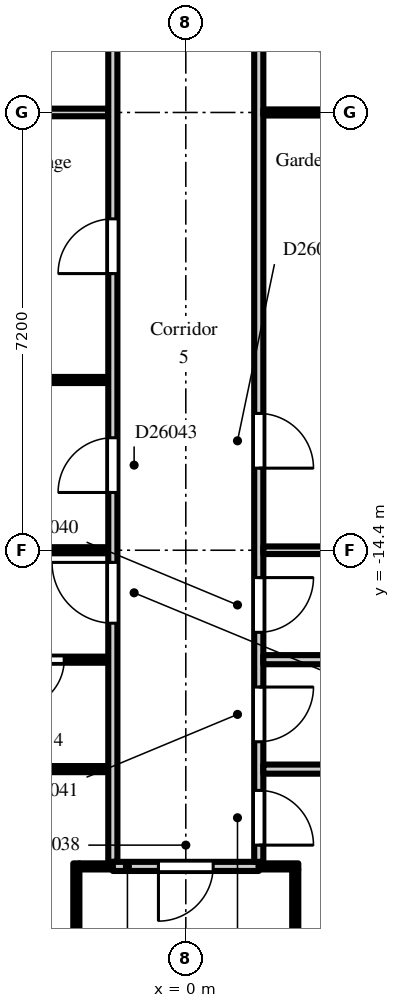
"""IFC4 building model, lengths in metres.
Left out: names, types, materials, properties, quantities, classifications, styles, units other than length and angle.
Written with IfcOpenShell. Run it as: python <this file> out.ifc"""

import sys

from ifc_helpers import new_model, si_unit, direction, frame, frame_2d, origin, place, context, subcontext, project, spatial, rectangle, extrude, element, fill, save


model = new_model("IFC4")
c1 = context("Model", 3, precision=1e-05, world=origin(), true_north=direction((0.0, 1.0)))
c2 = subcontext(c1, "Body", "Model", "MODEL_VIEW")
j1 = project(units=[si_unit("LENGTHUNIT", "METRE"), si_unit("PLANEANGLEUNIT", "RADIAN")], contexts=[c1])
p1 = place(None, origin())
s1 = spatial("IfcSite", under=j1, at=p1, CompositionType="ELEMENT")
p2 = place(p1, origin())
s2 = spatial("IfcBuilding", under=s1, at=p2, CompositionType="ELEMENT")
p3 = place(p2, frame((0.0, 0.0, 179.7)))
s3 = spatial("IfcBuildingStorey", under=s2, at=p3, CompositionType="ELEMENT", Elevation=179.7)
for number, where, z_axis, x_axis in (
    (1, (-3.9, -14.4, 0.0), (0.0, 0.0, 1.0), (1.0, 0.0, 0.0)),
    (2, (-3.9, -11.6, 0.0), (0.0, 0.0, 1.0), (1.0, 0.0, 0.0)),
):
    element("IfcWall", number, at=place(p3, frame(where, z_axis=z_axis, x_axis=x_axis)), inside=s3, PredefinedType="PARTITIONING", context=c2, shape_type="SweptSolid", body=[
        extrude(rectangle(XDim=2.625, YDim=0.1, at=frame_2d((1.312, 0.0))), origin(), (0.0, 0.0, 1.0), 2.6),
    ])
p4 = place(p3, frame((-3.9, -7.2, 0.0), z_axis=(0.0, 0.0, 1.0), x_axis=(1.0, 0.0, 0.0)))
e3 = element("IfcWall", 3, at=p4, inside=s3, PredefinedType="PARTITIONING", context=c2, shape_type="SweptSolid", body=[
    extrude(rectangle(XDim=2.625, YDim=0.125, at=frame_2d((1.312, 0.0))), origin(), (0.0, 0.0, 1.0), 2.6),
])
p5 = place(p3, frame((-3.55, -18.0, 0.0), z_axis=(0.0, 0.0, 1.0), x_axis=(1.0, 0.0, 0.0)))
e4 = element("IfcWall", 4, at=p5, inside=s3, PredefinedType="PARTITIONING", context=c2, shape_type="SweptSolid", body=[
    extrude(rectangle(XDim=2.275, YDim=0.1, at=frame_2d((1.138, 0.0))), origin(), (0.0, 0.0, 1.0), 2.6),
])
p6 = place(p3, frame((-3.55, -16.2, 0.0), z_axis=(0.0, 0.0, 1.0), x_axis=(1.0, 0.0, 0.0)))
e5 = element("IfcWall", 5, at=p6, inside=s3, PredefinedType="PARTITIONING", context=c2, shape_type="SweptSolid", body=[
    extrude(rectangle(XDim=2.275, YDim=0.1, at=frame_2d((1.138, 0.0))), origin(), (0.0, 0.0, 1.0), 2.6),
])
p7 = place(p6, frame((0.75, 0.0, 0.0)))
e6 = element("IfcOpeningElement", 6, at=p7, cuts=e5, PredefinedType="OPENING", context=c2, shape_type="SweptSolid", body=[
    extrude(rectangle(XDim=0.8, YDim=2.1, at=frame_2d((0.4, 1.05))), frame((0.0, 0.06, 0.0), z_axis=(0.0, -1.0, 0.0), x_axis=(1.0, 0.0, 0.0)), (0.0, 0.0, 1.0), 0.12),
])
p8 = place(p3, frame((-1.8, -21.3, 0.0), z_axis=(0.0, 0.0, 1.0), x_axis=(0.0, 1.0, 0.0)))
e7 = element("IfcWall", 7, at=p8, inside=s3, PredefinedType="PARTITIONING", context=c2, shape_type="SweptSolid", body=[
    extrude(rectangle(XDim=1.75, YDim=0.1, at=frame_2d((0.875, 0.0))), origin(), (0.0, 0.0, 1.0), 2.6),
])
p9 = place(p3, frame((-1.75, -19.6, 0.0), z_axis=(0.0, 0.0, 1.0), x_axis=(1.0, 0.0, 0.0)))
e8 = element("IfcWall", 8, at=p9, inside=s3, PredefinedType="PARTITIONING", context=c2, shape_type="SweptSolid", body=[
    extrude(rectangle(XDim=0.55, YDim=0.1, at=frame_2d((0.275, 0.0))), origin(), (0.0, 0.0, 1.0), 2.6),
])
p10 = place(p3, frame((-1.2, -19.525, 0.0), z_axis=(0.0, 0.0, 1.0), x_axis=(0.0, 1.0, 0.0)))
e9 = element("IfcWall", 9, at=p10, inside=s3, PredefinedType="PARTITIONING", context=c2, shape_type="SweptSolid", body=[
    extrude(rectangle(XDim=18.25, YDim=0.15, at=frame_2d((9.125, 0.0))), origin(), (0.0, 0.0, 1.0), 2.6),
])
p11 = place(p10, frame((14.875, 0.0, 0.0)))
e10 = element("IfcOpeningElement", 10, at=p11, cuts=e9, PredefinedType="OPENING", context=c2, shape_type="SweptSolid", body=[
    extrude(rectangle(XDim=0.9, YDim=2.1, at=frame_2d((0.45, 1.05))), frame((0.0, 0.085, 0.0), z_axis=(0.0, -1.0, 0.0), x_axis=(1.0, 0.0, 0.0)), (0.0, 0.0, 1.0), 0.17),
])
p12 = place(p10, frame((6.075, 0.0, 0.0)))
e11 = element("IfcOpeningElement", 11, at=p12, cuts=e9, PredefinedType="OPENING", context=c2, shape_type="SweptSolid", body=[
    extrude(rectangle(XDim=0.9, YDim=2.1, at=frame_2d((0.45, 1.05))), frame((0.0, 0.085, 0.0), z_axis=(0.0, -1.0, 0.0), x_axis=(1.0, 0.0, 0.0)), (0.0, 0.0, 1.0), 0.17),
])
p13 = place(p10, frame((9.675, 0.0, 0.0)))
e12 = element("IfcOpeningElement", 12, at=p13, cuts=e9, PredefinedType="OPENING", context=c2, shape_type="SweptSolid", body=[
    extrude(rectangle(XDim=0.9, YDim=2.1, at=frame_2d((0.45, 1.05))), frame((0.0, 0.085, 0.0), z_axis=(0.0, -1.0, 0.0), x_axis=(1.0, 0.0, 0.0)), (0.0, 0.0, 1.0), 0.17),
])
p14 = place(p10, frame((3.925, 0.0, 0.0)))
e13 = element("IfcOpeningElement", 13, at=p14, cuts=e9, PredefinedType="OPENING", context=c2, shape_type="SweptSolid", body=[
    extrude(rectangle(XDim=1.0, YDim=2.1, at=frame_2d((0.5, 1.05))), frame((0.0, 0.085, 0.0), z_axis=(0.0, -1.0, 0.0), x_axis=(1.0, 0.0, 0.0)), (0.0, 0.0, 1.0), 0.17),
])
p15 = place(p3, frame((-1.2, -19.6, 0.0), z_axis=(0.0, 0.0, 1.0), x_axis=(1.0, 0.0, 0.0)))
e14 = element("IfcWall", 14, at=p15, inside=s3, PredefinedType="PARTITIONING", context=c2, shape_type="SweptSolid", body=[
    extrude(rectangle(XDim=2.4, YDim=0.15, at=frame_2d((1.2, 0.0))), origin(), (0.0, 0.0, 1.0), 2.6),
])
p16 = place(p15, frame((0.75, 0.0, 0.0)))
e15 = element("IfcOpeningElement", 15, at=p16, cuts=e14, PredefinedType="OPENING", context=c2, shape_type="SweptSolid", body=[
    extrude(rectangle(XDim=0.9, YDim=2.1, at=frame_2d((0.45, 1.05))), frame((0.0, 0.085, 0.0), z_axis=(0.0, -1.0, 0.0), x_axis=(1.0, 0.0, 0.0)), (0.0, 0.0, 1.0), 0.17),
])
p17 = place(p3, frame((1.2, -19.525, 0.0), z_axis=(0.0, 0.0, 1.0), x_axis=(0.0, 1.0, 0.0)))
e16 = element("IfcWall", 16, at=p17, inside=s3, PredefinedType="PARTITIONING", context=c2, shape_type="SweptSolid", body=[
    extrude(rectangle(XDim=18.4, YDim=0.15, at=frame_2d((9.2, 0.0))), origin(), (0.0, 0.0, 1.0), 2.6),
])
p18 = place(p17, frame((14.875, 0.0, 0.0)))
e17 = element("IfcOpeningElement", 17, at=p18, cuts=e16, PredefinedType="OPENING", context=c2, shape_type="SweptSolid", body=[
    extrude(rectangle(XDim=0.9, YDim=2.1, at=frame_2d((0.45, 1.05))), frame((0.0, 0.085, 0.0), z_axis=(0.0, -1.0, 0.0), x_axis=(1.0, 0.0, 0.0)), (0.0, 0.0, 1.0), 0.17),
])
p19 = place(p17, frame((6.475, 0.0, 0.0)))
e18 = element("IfcOpeningElement", 18, at=p19, cuts=e16, PredefinedType="OPENING", context=c2, shape_type="SweptSolid", body=[
    extrude(rectangle(XDim=0.9, YDim=2.1, at=frame_2d((0.45, 1.05))), frame((0.0, 0.085, 0.0), z_axis=(0.0, -1.0, 0.0), x_axis=(1.0, 0.0, 0.0)), (0.0, 0.0, 1.0), 0.17),
])
p20 = place(p17, frame((3.775, 0.0, 0.0)))
e19 = element("IfcOpeningElement", 19, at=p20, cuts=e16, PredefinedType="OPENING", context=c2, shape_type="SweptSolid", body=[
    extrude(rectangle(XDim=0.9, YDim=2.1, at=frame_2d((0.45, 1.05))), frame((0.0, 0.085, 0.0), z_axis=(0.0, -1.0, 0.0), x_axis=(1.0, 0.0, 0.0)), (0.0, 0.0, 1.0), 0.17),
])
p21 = place(p17, frame((1.975, 0.0, 0.0)))
e20 = element("IfcOpeningElement", 20, at=p21, cuts=e16, PredefinedType="OPENING", context=c2, shape_type="SweptSolid", body=[
    extrude(rectangle(XDim=0.9, YDim=2.1, at=frame_2d((0.45, 1.05))), frame((0.0, 0.085, 0.0), z_axis=(0.0, -1.0, 0.0), x_axis=(1.0, 0.0, 0.0)), (0.0, 0.0, 1.0), 0.17),
])
p22 = place(p17, frame((0.275, 0.0, 0.0)))
e21 = element("IfcOpeningElement", 21, at=p22, cuts=e16, PredefinedType="OPENING", context=c2, shape_type="SweptSolid", body=[
    extrude(rectangle(XDim=0.9, YDim=2.1, at=frame_2d((0.45, 1.05))), frame((0.0, 0.085, 0.0), z_axis=(0.0, -1.0, 0.0), x_axis=(1.0, 0.0, 0.0)), (0.0, 0.0, 1.0), 0.17),
])
p23 = place(p3, frame((1.2, -19.6, 0.0), z_axis=(0.0, 0.0, 1.0), x_axis=(1.0, 0.0, 0.0)))
e22 = element("IfcWall", 22, at=p23, inside=s3, PredefinedType="PARTITIONING", context=c2, shape_type="SweptSolid", body=[
    extrude(rectangle(XDim=0.65, YDim=0.1, at=frame_2d((0.325, 0.0))), origin(), (0.0, 0.0, 1.0), 2.6),
])
p24 = place(p3, frame((1.275, -18.0, 0.0), z_axis=(0.0, 0.0, 1.0), x_axis=(1.0, 0.0, 0.0)))
e23 = element("IfcWall", 23, at=p24, inside=s3, PredefinedType="PARTITIONING", context=c2, shape_type="SweptSolid", body=[
    extrude(rectangle(XDim=3.825, YDim=0.15, at=frame_2d((1.913, 0.0))), origin(), (0.0, 0.0, 1.0), 2.6),
])
p25 = place(p3, frame((1.275, -16.2, 0.0), z_axis=(0.0, 0.0, 1.0), x_axis=(1.0, 0.0, 0.0)))
e24 = element("IfcWall", 24, at=p25, inside=s3, PredefinedType="PARTITIONING", context=c2, shape_type="SweptSolid", body=[
    extrude(rectangle(XDim=5.625, YDim=0.15, at=frame_2d((2.812, 0.0))), origin(), (0.0, 0.0, 1.0), 2.6),
])
p26 = place(p3, frame((1.275, -14.4, 0.0), z_axis=(0.0, 0.0, 1.0), x_axis=(1.0, 0.0, 0.0)))
e25 = element("IfcWall", 25, at=p26, inside=s3, PredefinedType="PARTITIONING", context=c2, shape_type="SweptSolid", body=[
    extrude(rectangle(XDim=2.625, YDim=0.125, at=frame_2d((1.312, 0.0))), origin(), (0.0, 0.0, 1.0), 2.6),
])
p27 = place(p3, frame((1.275, -7.2, 0.0), z_axis=(0.0, 0.0, 1.0), x_axis=(1.0, 0.0, 0.0)))
e26 = element("IfcWall", 26, at=p27, inside=s3, PredefinedType="PARTITIONING", context=c2, shape_type="SweptSolid", body=[
    extrude(rectangle(XDim=2.625, YDim=0.1, at=frame_2d((1.312, 0.0))), origin(), (0.0, 0.0, 1.0), 2.6),
])
p28 = place(p3, frame((1.8, -21.3, 0.0), z_axis=(0.0, 0.0, 1.0), x_axis=(0.0, 1.0, 0.0)))
e27 = element("IfcWall", 27, at=p28, inside=s3, PredefinedType="PARTITIONING", context=c2, shape_type="SweptSolid", body=[
    extrude(rectangle(XDim=1.65, YDim=0.1, at=frame_2d((0.825, 0.0))), origin(), (0.0, 0.0, 1.0), 2.6),
])
p29 = place(p16, frame((0.9, 0.0, 0.0), z_axis=(0.0, 0.0, 1.0), x_axis=(-1.0, 0.0, 0.0)))
e28 = element("IfcDoor", 28, at=p29, inside=s3, OperationType="SINGLE_SWING_RIGHT", PredefinedType="DOOR", context=c2, shape_type="SweptSolid", body=[
    extrude(rectangle(XDim=0.9, YDim=2.1, at=frame_2d((0.45, 1.05))), frame((0.0, 0.025, 0.0), z_axis=(0.0, -1.0, 0.0), x_axis=(1.0, 0.0, 0.0)), (0.0, 0.0, 1.0), 0.05),
])
fill(e15, e28)
p30 = place(p19, frame((0.9, 0.0, 0.0), z_axis=(0.0, 0.0, 1.0), x_axis=(-1.0, 0.0, 0.0)))
e29 = element("IfcDoor", 29, at=p30, inside=s3, OperationType="SINGLE_SWING_RIGHT", PredefinedType="DOOR", context=c2, shape_type="SweptSolid", body=[
    extrude(rectangle(XDim=0.9, YDim=2.1, at=frame_2d((0.45, 1.05))), frame((0.0, 0.025, 0.0), z_axis=(0.0, -1.0, 0.0), x_axis=(1.0, 0.0, 0.0)), (0.0, 0.0, 1.0), 0.05),
])
fill(e18, e29)
p31 = place(p20, frame((0.9, 0.0, 0.0), z_axis=(0.0, 0.0, 1.0), x_axis=(-1.0, 0.0, 0.0)))
e30 = element("IfcDoor", 30, at=p31, inside=s3, OperationType="SINGLE_SWING_LEFT", PredefinedType="DOOR", context=c2, shape_type="SweptSolid", body=[
    extrude(rectangle(XDim=0.9, YDim=2.1, at=frame_2d((0.45, 1.05))), frame((0.0, 0.025, 0.0), z_axis=(0.0, -1.0, 0.0), x_axis=(1.0, 0.0, 0.0)), (0.0, 0.0, 1.0), 0.05),
])
fill(e19, e30)
p32 = place(p21, frame((0.9, 0.0, 0.0), z_axis=(0.0, 0.0, 1.0), x_axis=(-1.0, 0.0, 0.0)))
e31 = element("IfcDoor", 31, at=p32, inside=s3, OperationType="SINGLE_SWING_LEFT", PredefinedType="DOOR", context=c2, shape_type="SweptSolid", body=[
    extrude(rectangle(XDim=0.9, YDim=2.1, at=frame_2d((0.45, 1.05))), frame((0.0, 0.025, 0.0), z_axis=(0.0, -1.0, 0.0), x_axis=(1.0, 0.0, 0.0)), (0.0, 0.0, 1.0), 0.05),
])
fill(e20, e31)
p33 = place(p22, frame((0.9, 0.0, 0.0), z_axis=(0.0, 0.0, 1.0), x_axis=(-1.0, 0.0, 0.0)))
e32 = element("IfcDoor", 32, at=p33, inside=s3, OperationType="SINGLE_SWING_RIGHT", PredefinedType="DOOR", context=c2, shape_type="SweptSolid", body=[
    extrude(rectangle(XDim=0.9, YDim=2.1, at=frame_2d((0.45, 1.05))), frame((0.0, 0.025, 0.0), z_axis=(0.0, -1.0, 0.0), x_axis=(1.0, 0.0, 0.0)), (0.0, 0.0, 1.0), 0.05),
])
fill(e21, e32)
p34 = place(p12, origin())
e33 = element("IfcDoor", 33, at=p34, inside=s3, OperationType="SINGLE_SWING_LEFT", PredefinedType="DOOR", context=c2, shape_type="SweptSolid", body=[
    extrude(rectangle(XDim=0.9, YDim=2.1, at=frame_2d((0.45, 1.05))), frame((0.0, 0.025, 0.0), z_axis=(0.0, -1.0, 0.0), x_axis=(1.0, 0.0, 0.0)), (0.0, 0.0, 1.0), 0.05),
])
fill(e11, e33)
p35 = place(p13, origin())
e34 = element("IfcDoor", 34, at=p35, inside=s3, OperationType="SINGLE_SWING_LEFT", PredefinedType="DOOR", context=c2, shape_type="SweptSolid", body=[
    extrude(rectangle(XDim=0.9, YDim=2.1, at=frame_2d((0.45, 1.05))), frame((0.0, 0.025, 0.0), z_axis=(0.0, -1.0, 0.0), x_axis=(1.0, 0.0, 0.0)), (0.0, 0.0, 1.0), 0.05),
])
fill(e12, e34)
p36 = place(p7, frame((0.8, 0.0, 0.0), z_axis=(0.0, 0.0, 1.0), x_axis=(-1.0, 0.0, 0.0)))
e35 = element("IfcDoor", 35, at=p36, inside=s3, OperationType="SINGLE_SWING_RIGHT", PredefinedType="DOOR", context=c2, shape_type="SweptSolid", body=[
    extrude(rectangle(XDim=0.8, YDim=2.1, at=frame_2d((0.4, 1.05))), frame((0.0, 0.025, 0.0), z_axis=(0.0, -1.0, 0.0), x_axis=(1.0, 0.0, 0.0)), (0.0, 0.0, 1.0), 0.05),
])
fill(e6, e35)
p37 = place(p14, origin())
e36 = element("IfcDoor", 36, at=p37, inside=s3, OperationType="SINGLE_SWING_RIGHT", PredefinedType="DOOR", context=c2, shape_type="SweptSolid", body=[
    extrude(rectangle(XDim=1.0, YDim=2.1, at=frame_2d((0.5, 1.05))), frame((0.0, 0.025, 0.0), z_axis=(0.0, -1.0, 0.0), x_axis=(1.0, 0.0, 0.0)), (0.0, 0.0, 1.0), 0.05),
])
fill(e13, e36)
save(model, sys.argv[1])
